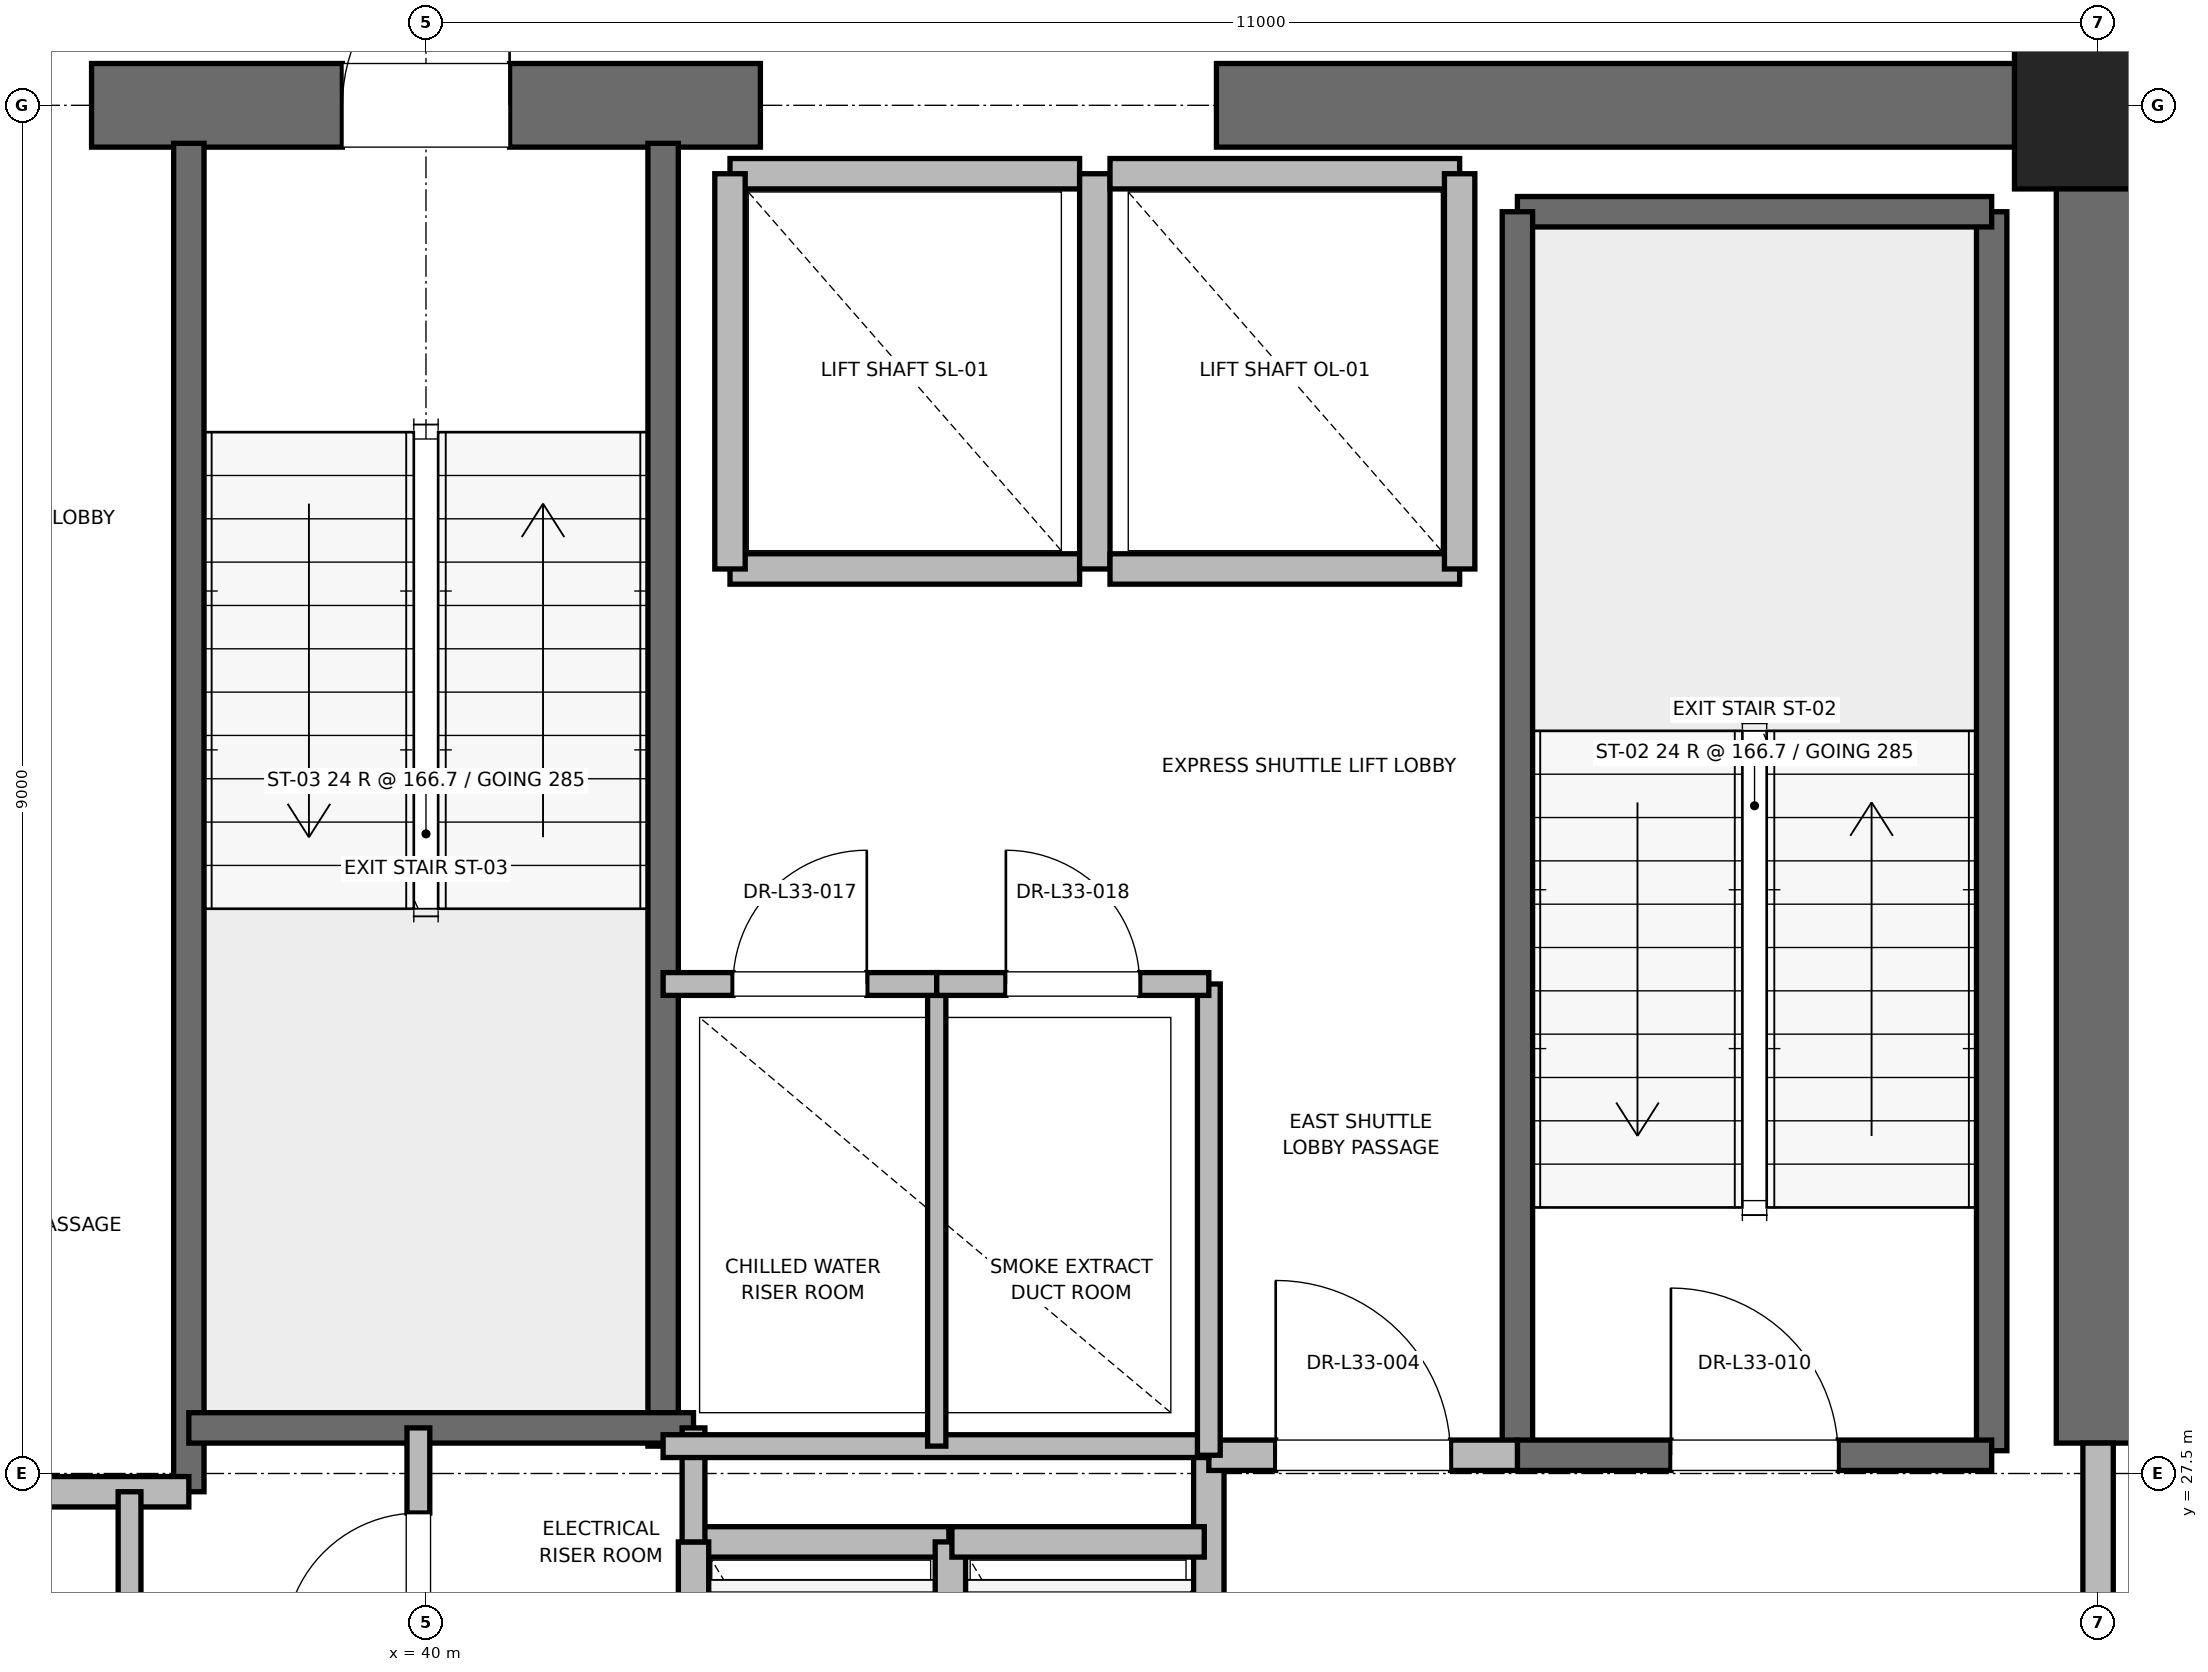
"""IFC4 building model, lengths in metres.
Left out: names, types, materials, properties, quantities, classifications, styles, units other than length and angle.
Written with IfcOpenShell. Run it as: python <this file> out.ifc"""

import sys

from ifc_helpers import new_model, si_unit, direction, frame, frame_2d, origin, origin_2d, place, context, subcontext, project, spatial, rectangle, extrude, element, fill, save


model = new_model("IFC4")
c1 = context("Model", 3, precision=1e-05, world=origin(), true_north=direction((0.0, 1.0)))
c2 = subcontext(c1, "Body", "Model", "MODEL_VIEW")
j1 = project(units=[si_unit("LENGTHUNIT", "METRE"), si_unit("PLANEANGLEUNIT", "RADIAN")], contexts=[c1])
p1 = place(None, origin())
s1 = spatial("IfcSite", under=j1, at=p1, CompositionType="ELEMENT")
p2 = place(p1, origin())
s2 = spatial("IfcBuilding", under=s1, at=p2, CompositionType="ELEMENT")
p3 = place(p2, frame((0.0, 0.0, 144.4)))
s3 = spatial("IfcBuildingStorey", under=s2, at=p3, CompositionType="ELEMENT", Elevation=144.4)
p4 = place(p3, frame((51.0, 36.5, 0.0), z_axis=(0.0, 0.0, 1.0), x_axis=(1.0, 0.0, 0.0)))
e1 = element("IfcColumn", 1, at=p4, inside=s3, PredefinedType="PILASTER", context=c2, shape_type="SweptSolid", body=[
    extrude(rectangle(XDim=1.1, YDim=1.1, at=origin_2d()), origin(), (0.0, 0.0, 1.0), 4.0),
])
p5 = place(p3, frame((37.8, 36.5, 0.0), z_axis=(0.0, 0.0, 1.0), x_axis=(1.0, 0.0, 0.0)))
e2 = element("IfcWall", 2, at=p5, inside=s3, PredefinedType="SHEAR", context=c2, shape_type="SweptSolid", body=[
    extrude(rectangle(XDim=4.4, YDim=0.55, at=frame_2d((2.2, 0.0))), origin(), (0.0, 0.0, 1.0), 3.775),
])
p6 = place(p5, frame((1.65, 0.0, 0.0)))
e3 = element("IfcOpeningElement", 3, at=p6, cuts=e2, PredefinedType="OPENING", context=c2, shape_type="SweptSolid", body=[
    extrude(rectangle(XDim=1.1, YDim=2.15, at=frame_2d((0.55, 1.075))), frame((0.0, 0.275, 0.0), z_axis=(0.0, -1.0, 0.0), x_axis=(1.0, 0.0, 0.0)), (0.0, 0.0, 1.0), 0.55),
])
p7 = place(p3, frame((45.2, 36.5, 0.0), z_axis=(0.0, 0.0, 1.0), x_axis=(1.0, 0.0, 0.0)))
e4 = element("IfcWall", 4, at=p7, inside=s3, PredefinedType="SHEAR", context=c2, shape_type="SweptSolid", body=[
    extrude(rectangle(XDim=5.8, YDim=0.55, at=frame_2d((2.9, 0.0))), origin(), (0.0, 0.0, 1.0), 3.775),
])
p8 = place(p3, frame((51.0, 27.7, 0.0), z_axis=(0.0, 0.0, 1.0), x_axis=(0.0, 1.0, 0.0)))
e5 = element("IfcWall", 5, at=p8, inside=s3, PredefinedType="SHEAR", context=c2, shape_type="SweptSolid", body=[
    extrude(rectangle(XDim=8.8, YDim=0.55, at=frame_2d((4.4, 0.0))), origin(), (0.0, 0.0, 1.0), 3.775),
])
p9 = place(p3, frame((50.3, 27.65, 0.0), z_axis=(0.0, 0.0, 1.0), x_axis=(0.0, 1.0, 0.0)))
e6 = element("IfcWall", 6, at=p9, inside=s3, PredefinedType="SOLIDWALL", context=c2, shape_type="SweptSolid", body=[
    extrude(rectangle(XDim=8.15, YDim=0.2, at=frame_2d((4.075, 0.0))), origin(), (0.0, 0.0, 1.0), 3.775),
])
p10 = place(p3, frame((47.18, 35.8, 0.0), z_axis=(0.0, 0.0, 1.0), x_axis=(1.0, 0.0, 0.0)))
e7 = element("IfcWall", 7, at=p10, inside=s3, PredefinedType="SOLIDWALL", context=c2, shape_type="SweptSolid", body=[
    extrude(rectangle(XDim=3.12, YDim=0.2, at=frame_2d((1.56, 0.0))), origin(), (0.0, 0.0, 1.0), 3.775),
])
p11 = place(p3, frame((47.18, 27.62, 0.0), z_axis=(0.0, 0.0, 1.0), x_axis=(0.0, 1.0, 0.0)))
e8 = element("IfcWall", 8, at=p11, inside=s3, PredefinedType="SOLIDWALL", context=c2, shape_type="SweptSolid", body=[
    extrude(rectangle(XDim=8.18, YDim=0.2, at=frame_2d((4.09, 0.0))), origin(), (0.0, 0.0, 1.0), 3.775),
])
p12 = place(p3, frame((47.18, 27.62, 0.0), z_axis=(0.0, 0.0, 1.0), x_axis=(1.0, 0.0, 0.0)))
e9 = element("IfcWall", 9, at=p12, inside=s3, PredefinedType="SOLIDWALL", context=c2, shape_type="SweptSolid", body=[
    extrude(rectangle(XDim=3.12, YDim=0.2, at=frame_2d((1.56, 0.0))), origin(), (0.0, 0.0, 1.0), 3.775),
])
p13 = place(p12, frame((1.01, 0.0, 0.0)))
e10 = element("IfcOpeningElement", 10, at=p13, cuts=e9, PredefinedType="OPENING", context=c2, shape_type="SweptSolid", body=[
    extrude(rectangle(XDim=1.1, YDim=2.15, at=frame_2d((0.55, 1.075))), frame((0.0, 0.1, 0.0), z_axis=(0.0, -1.0, 0.0), x_axis=(1.0, 0.0, 0.0)), (0.0, 0.0, 1.0), 0.2),
])
p14 = place(p3, frame((38.44, 27.38, 0.0), z_axis=(0.0, 0.0, 1.0), x_axis=(0.0, 1.0, 0.0)))
e11 = element("IfcWall", 11, at=p14, inside=s3, PredefinedType="SOLIDWALL", context=c2, shape_type="SweptSolid", body=[
    extrude(rectangle(XDim=8.87, YDim=0.2, at=frame_2d((4.435, 0.0))), origin(), (0.0, 0.0, 1.0), 3.775),
])
p15 = place(p3, frame((41.56, 27.68, 0.0), z_axis=(0.0, 0.0, 1.0), x_axis=(0.0, 1.0, 0.0)))
e12 = element("IfcWall", 12, at=p15, inside=s3, PredefinedType="SOLIDWALL", context=c2, shape_type="SweptSolid", body=[
    extrude(rectangle(XDim=8.57, YDim=0.2, at=frame_2d((4.285, 0.0))), origin(), (0.0, 0.0, 1.0), 3.775),
])
p16 = place(p3, frame((38.44, 27.8, 0.0), z_axis=(0.0, 0.0, 1.0), x_axis=(1.0, 0.0, 0.0)))
e13 = element("IfcWall", 13, at=p16, inside=s3, PredefinedType="SOLIDWALL", context=c2, shape_type="SweptSolid", body=[
    extrude(rectangle(XDim=3.32, YDim=0.2, at=frame_2d((1.66, 0.0))), origin(), (0.0, 0.0, 1.0), 3.775),
])
p17 = place(p3, frame((32.82, 27.38, 0.0), z_axis=(0.0, 0.0, 1.0), x_axis=(1.0, 0.0, 0.0)))
e14 = element("IfcWall", 14, at=p17, inside=s3, PredefinedType="PARTITIONING", context=c2, shape_type="SweptSolid", body=[
    extrude(rectangle(XDim=5.62, YDim=0.2, at=frame_2d((2.81, 0.0))), origin(), (0.0, 0.0, 1.0), 3.775),
])
p18 = place(p3, frame((45.15, 24.25, 0.0), z_axis=(0.0, 0.0, 1.0), x_axis=(0.0, 1.0, 0.0)))
e15 = element("IfcWall", 15, at=p18, inside=s3, PredefinedType="PARTITIONING", context=c2, shape_type="SweptSolid", body=[
    extrude(rectangle(XDim=3.37, YDim=0.2, at=frame_2d((1.685, 0.0))), origin(), (0.0, 0.0, 1.0), 3.775),
])
p19 = place(p3, frame((45.15, 27.62, 0.0), z_axis=(0.0, 0.0, 1.0), x_axis=(1.0, 0.0, 0.0)))
e16 = element("IfcWall", 16, at=p19, inside=s3, PredefinedType="PARTITIONING", context=c2, shape_type="SweptSolid", body=[
    extrude(rectangle(XDim=2.03, YDim=0.2, at=frame_2d((1.015, 0.0))), origin(), (0.0, 0.0, 1.0), 3.775),
])
p20 = place(p19, frame((0.44, 0.0, 0.0)))
e17 = element("IfcOpeningElement", 17, at=p20, cuts=e16, PredefinedType="OPENING", context=c2, shape_type="SweptSolid", body=[
    extrude(rectangle(XDim=1.15, YDim=2.2, at=frame_2d((0.575, 1.1))), frame((0.0, 0.1, 0.0), z_axis=(0.0, -1.0, 0.0), x_axis=(1.0, 0.0, 0.0)), (0.0, 0.0, 1.0), 0.2),
])
p21 = place(p3, frame((51.0, 24.3, 0.0), z_axis=(0.0, 0.0, 1.0), x_axis=(0.0, 1.0, 0.0)))
e18 = element("IfcWall", 18, at=p21, inside=s3, PredefinedType="PARTITIONING", context=c2, shape_type="SweptSolid", body=[
    extrude(rectangle(XDim=3.4, YDim=0.2, at=frame_2d((1.7, 0.0))), origin(), (0.0, 0.0, 1.0), 2.755),
])
p22 = place(p21, frame((1.125, 0.0, 0.0)))
e19 = element("IfcOpeningElement", 19, at=p22, cuts=e18, PredefinedType="OPENING", context=c2, shape_type="SweptSolid", body=[
    extrude(rectangle(XDim=1.15, YDim=2.2, at=frame_2d((0.575, 1.1))), frame((0.0, 0.1, 0.0), z_axis=(0.0, -1.0, 0.0), x_axis=(1.0, 0.0, 0.0)), (0.0, 0.0, 1.0), 0.2),
])
p23 = place(p3, frame((43.44, 27.05, 0.0), z_axis=(0.0, 0.0, 1.0), x_axis=(-1.0, 0.0, 0.0)))
e20 = element("IfcWall", 20, at=p23, inside=s3, PredefinedType="SOLIDWALL", context=c2, shape_type="SweptSolid", body=[
    extrude(rectangle(XDim=1.68, YDim=0.2, at=frame_2d((0.84, 0.0))), origin(), (0.0, 0.0, 1.0), 3.775),
])
for number, where, z_axis, x_axis in (
    (21, (41.76, 27.05, 0.0), (0.0, 0.0, 1.0), (0.0, -1.0, 0.0)),
    (22, (43.45, 24.45, 0.0), (0.0, 0.0, 1.0), (0.0, 1.0, 0.0)),
):
    element("IfcWall", number, at=place(p3, frame(where, z_axis=z_axis, x_axis=x_axis)), inside=s3, PredefinedType="SOLIDWALL", context=c2, shape_type="SweptSolid", body=[
        extrude(rectangle(XDim=2.6, YDim=0.2, at=frame_2d((1.3, 0.0))), origin(), (0.0, 0.0, 1.0), 3.775),
    ])
p24 = place(p3, frame((45.12, 27.05, 0.0), z_axis=(0.0, 0.0, 1.0), x_axis=(-1.0, 0.0, 0.0)))
e23 = element("IfcWall", 23, at=p24, inside=s3, PredefinedType="SOLIDWALL", context=c2, shape_type="SweptSolid", body=[
    extrude(rectangle(XDim=1.66, YDim=0.2, at=frame_2d((0.83, 0.0))), origin(), (0.0, 0.0, 1.0), 3.775),
])
p25 = place(p3, frame((42.0, 33.45, 0.0), z_axis=(0.0, 0.0, 1.0), x_axis=(1.0, 0.0, 0.0)))
e24 = element("IfcWall", 24, at=p25, inside=s3, PredefinedType="SOLIDWALL", context=c2, shape_type="SweptSolid", body=[
    extrude(rectangle(XDim=2.3, YDim=0.2, at=frame_2d((1.15, 0.0))), origin(), (0.0, 0.0, 1.0), 3.775),
])
p26 = place(p3, frame((44.3, 36.05, 0.0), z_axis=(0.0, 0.0, 1.0), x_axis=(-1.0, 0.0, 0.0)))
e25 = element("IfcWall", 25, at=p26, inside=s3, PredefinedType="SOLIDWALL", context=c2, shape_type="SweptSolid", body=[
    extrude(rectangle(XDim=2.3, YDim=0.2, at=frame_2d((1.15, 0.0))), origin(), (0.0, 0.0, 1.0), 2.755),
])
for number, where, z_axis, x_axis in (
    (26, (42.0, 36.05, 0.0), (0.0, 0.0, 1.0), (0.0, -1.0, 0.0)),
    (27, (44.4, 33.45, 0.0), (0.0, 0.0, 1.0), (0.0, 1.0, 0.0)),
):
    element("IfcWall", number, at=place(p3, frame(where, z_axis=z_axis, x_axis=x_axis)), inside=s3, PredefinedType="SOLIDWALL", context=c2, shape_type="SweptSolid", body=[
        extrude(rectangle(XDim=2.6, YDim=0.2, at=frame_2d((1.3, 0.0))), origin(), (0.0, 0.0, 1.0), 2.755),
    ])
p27 = place(p3, frame((44.5, 33.45, 0.0), z_axis=(0.0, 0.0, 1.0), x_axis=(1.0, 0.0, 0.0)))
e28 = element("IfcWall", 28, at=p27, inside=s3, PredefinedType="SOLIDWALL", context=c2, shape_type="SweptSolid", body=[
    extrude(rectangle(XDim=2.3, YDim=0.2, at=frame_2d((1.15, 0.0))), origin(), (0.0, 0.0, 1.0), 3.775),
])
p28 = place(p3, frame((46.8, 36.05, 0.0), z_axis=(0.0, 0.0, 1.0), x_axis=(-1.0, 0.0, 0.0)))
e29 = element("IfcWall", 29, at=p28, inside=s3, PredefinedType="SOLIDWALL", context=c2, shape_type="SweptSolid", body=[
    extrude(rectangle(XDim=2.3, YDim=0.2, at=frame_2d((1.15, 0.0))), origin(), (0.0, 0.0, 1.0), 2.755),
])
p29 = place(p3, frame((46.8, 33.45, 0.0), z_axis=(0.0, 0.0, 1.0), x_axis=(0.0, 1.0, 0.0)))
e30 = element("IfcWall", 30, at=p29, inside=s3, PredefinedType="SOLIDWALL", context=c2, shape_type="SweptSolid", body=[
    extrude(rectangle(XDim=2.6, YDim=0.2, at=frame_2d((1.3, 0.0))), origin(), (0.0, 0.0, 1.0), 3.775),
])
p30 = place(p3, frame((41.76, 27.05, 0.0), z_axis=(0.0, 0.0, 1.0), x_axis=(0.0, 1.0, 0.0)))
e31 = element("IfcWall", 31, at=p30, inside=s3, PredefinedType="PARTITIONING", context=c2, shape_type="SweptSolid", body=[
    extrude(rectangle(XDim=0.75, YDim=0.15, at=frame_2d((0.375, 0.0))), origin(), (0.0, 0.0, 1.0), 2.85),
])
p31 = place(p3, frame((39.95, 25.8, 0.0), z_axis=(0.0, 0.0, 1.0), x_axis=(0.0, 1.0, 0.0)))
e32 = element("IfcWall", 32, at=p31, inside=s3, PredefinedType="PARTITIONING", context=c2, shape_type="SweptSolid", body=[
    extrude(rectangle(XDim=2.0, YDim=0.15, at=frame_2d((1.0, 0.0))), origin(), (0.0, 0.0, 1.0), 2.85),
])
p32 = place(p31, frame((0.56, 0.0, 0.0)))
e33 = element("IfcOpeningElement", 33, at=p32, cuts=e32, PredefinedType="OPENING", context=c2, shape_type="SweptSolid", body=[
    extrude(rectangle(XDim=0.88, YDim=2.1, at=frame_2d((0.44, 1.05))), frame((0.0, 0.075, 0.0), z_axis=(0.0, -1.0, 0.0), x_axis=(1.0, 0.0, 0.0)), (0.0, 0.0, 1.0), 0.15),
])
p33 = place(p3, frame((38.05, 23.06, 0.0), z_axis=(0.0, 0.0, 1.0), x_axis=(0.0, 1.0, 0.0)))
e34 = element("IfcWall", 34, at=p33, inside=s3, PredefinedType="PARTITIONING", context=c2, shape_type="SweptSolid", body=[
    extrude(rectangle(XDim=4.32, YDim=0.15, at=frame_2d((2.16, 0.0))), origin(), (0.0, 0.0, 1.0), 2.85),
])
p34 = place(p33, frame((1.66, 0.0, 0.0)))
e35 = element("IfcOpeningElement", 35, at=p34, cuts=e34, PredefinedType="OPENING", context=c2, shape_type="SweptSolid", body=[
    extrude(rectangle(XDim=1.0, YDim=2.15, at=frame_2d((0.5, 1.075))), frame((0.0, 0.075, 0.0), z_axis=(0.0, -1.0, 0.0), x_axis=(1.0, 0.0, 0.0)), (0.0, 0.0, 1.0), 0.15),
])
p35 = place(p3, frame((41.56, 27.68, 0.0), z_axis=(0.0, 0.0, 1.0), x_axis=(1.0, 0.0, 0.0)))
e36 = element("IfcWall", 36, at=p35, inside=s3, PredefinedType="PARTITIONING", context=c2, shape_type="SweptSolid", body=[
    extrude(rectangle(XDim=3.59, YDim=0.15, at=frame_2d((1.795, 0.0))), origin(), (0.0, 0.0, 1.0), 2.85),
])
p36 = place(p3, frame((45.15, 27.62, 0.0), z_axis=(0.0, 0.0, 1.0), x_axis=(0.0, 1.0, 0.0)))
e37 = element("IfcWall", 37, at=p36, inside=s3, PredefinedType="PARTITIONING", context=c2, shape_type="SweptSolid", body=[
    extrude(rectangle(XDim=3.1, YDim=0.15, at=frame_2d((1.55, 0.0))), origin(), (0.0, 0.0, 1.0), 2.85),
])
p37 = place(p3, frame((43.36, 27.68, 0.0), z_axis=(0.0, 0.0, 1.0), x_axis=(0.0, 1.0, 0.0)))
e38 = element("IfcWall", 38, at=p37, inside=s3, PredefinedType="PARTITIONING", context=c2, shape_type="SweptSolid", body=[
    extrude(rectangle(XDim=3.04, YDim=0.12, at=frame_2d((1.52, 0.0))), origin(), (0.0, 0.0, 1.0), 2.85),
])
p38 = place(p3, frame((41.56, 30.72, 0.0), z_axis=(0.0, 0.0, 1.0), x_axis=(1.0, 0.0, 0.0)))
e39 = element("IfcWall", 39, at=p38, inside=s3, PredefinedType="PARTITIONING", context=c2, shape_type="SweptSolid", body=[
    extrude(rectangle(XDim=1.8, YDim=0.15, at=frame_2d((0.9, 0.0))), origin(), (0.0, 0.0, 1.0), 2.85),
])
p39 = place(p38, frame((0.46, 0.0, 0.0)))
e40 = element("IfcOpeningElement", 40, at=p39, cuts=e39, PredefinedType="OPENING", context=c2, shape_type="SweptSolid", body=[
    extrude(rectangle(XDim=0.88, YDim=2.1, at=frame_2d((0.44, 1.05))), frame((0.0, 0.075, 0.0), z_axis=(0.0, -1.0, 0.0), x_axis=(1.0, 0.0, 0.0)), (0.0, 0.0, 1.0), 0.15),
])
p40 = place(p3, frame((43.36, 30.72, 0.0), z_axis=(0.0, 0.0, 1.0), x_axis=(1.0, 0.0, 0.0)))
e41 = element("IfcWall", 41, at=p40, inside=s3, PredefinedType="PARTITIONING", context=c2, shape_type="SweptSolid", body=[
    extrude(rectangle(XDim=1.79, YDim=0.15, at=frame_2d((0.895, 0.0))), origin(), (0.0, 0.0, 1.0), 2.85),
])
p41 = place(p40, frame((0.455, 0.0, 0.0)))
e42 = element("IfcOpeningElement", 42, at=p41, cuts=e41, PredefinedType="OPENING", context=c2, shape_type="SweptSolid", body=[
    extrude(rectangle(XDim=0.88, YDim=2.1, at=frame_2d((0.44, 1.05))), frame((0.0, 0.075, 0.0), z_axis=(0.0, -1.0, 0.0), x_axis=(1.0, 0.0, 0.0)), (0.0, 0.0, 1.0), 0.15),
])
p42 = place(p13, origin())
e43 = element("IfcDoor", 43, at=p42, inside=s3, OperationType="SINGLE_SWING_LEFT", PredefinedType="DOOR", context=c2, shape_type="SweptSolid", body=[
    extrude(rectangle(XDim=1.1, YDim=2.15, at=frame_2d((0.55, 1.075))), frame((0.0, 0.025, 0.0), z_axis=(0.0, -1.0, 0.0), x_axis=(1.0, 0.0, 0.0)), (0.0, 0.0, 1.0), 0.05),
])
fill(e10, e43)
p43 = place(p6, origin())
e44 = element("IfcDoor", 44, at=p43, inside=s3, OperationType="SINGLE_SWING_RIGHT", PredefinedType="DOOR", context=c2, shape_type="SweptSolid", body=[
    extrude(rectangle(XDim=1.1, YDim=2.15, at=frame_2d((0.55, 1.075))), frame((0.0, 0.025, 0.0), z_axis=(0.0, -1.0, 0.0), x_axis=(1.0, 0.0, 0.0)), (0.0, 0.0, 1.0), 0.05),
])
fill(e3, e44)
p44 = place(p20, origin())
e45 = element("IfcDoor", 45, at=p44, inside=s3, OperationType="SINGLE_SWING_LEFT", PredefinedType="DOOR", context=c2, shape_type="SweptSolid", body=[
    extrude(rectangle(XDim=1.15, YDim=2.2, at=frame_2d((0.575, 1.1))), frame((0.0, 0.025, 0.0), z_axis=(0.0, -1.0, 0.0), x_axis=(1.0, 0.0, 0.0)), (0.0, 0.0, 1.0), 0.05),
])
fill(e17, e45)
p45 = place(p32, origin())
e46 = element("IfcDoor", 46, at=p45, inside=s3, OperationType="SINGLE_SWING_LEFT", PredefinedType="DOOR", context=c2, shape_type="SweptSolid", body=[
    extrude(rectangle(XDim=0.88, YDim=2.1, at=frame_2d((0.44, 1.05))), frame((0.0, 0.025, 0.0), z_axis=(0.0, -1.0, 0.0), x_axis=(1.0, 0.0, 0.0)), (0.0, 0.0, 1.0), 0.05),
])
fill(e33, e46)
p46 = place(p39, origin())
e47 = element("IfcDoor", 47, at=p46, inside=s3, OperationType="SINGLE_SWING_RIGHT", PredefinedType="DOOR", context=c2, shape_type="SweptSolid", body=[
    extrude(rectangle(XDim=0.88, YDim=2.1, at=frame_2d((0.44, 1.05))), frame((0.0, 0.025, 0.0), z_axis=(0.0, -1.0, 0.0), x_axis=(1.0, 0.0, 0.0)), (0.0, 0.0, 1.0), 0.05),
])
fill(e40, e47)
p47 = place(p41, origin())
e48 = element("IfcDoor", 48, at=p47, inside=s3, OperationType="SINGLE_SWING_LEFT", PredefinedType="DOOR", context=c2, shape_type="SweptSolid", body=[
    extrude(rectangle(XDim=0.88, YDim=2.1, at=frame_2d((0.44, 1.05))), frame((0.0, 0.025, 0.0), z_axis=(0.0, -1.0, 0.0), x_axis=(1.0, 0.0, 0.0)), (0.0, 0.0, 1.0), 0.05),
])
fill(e42, e48)
save(model, sys.argv[1])
